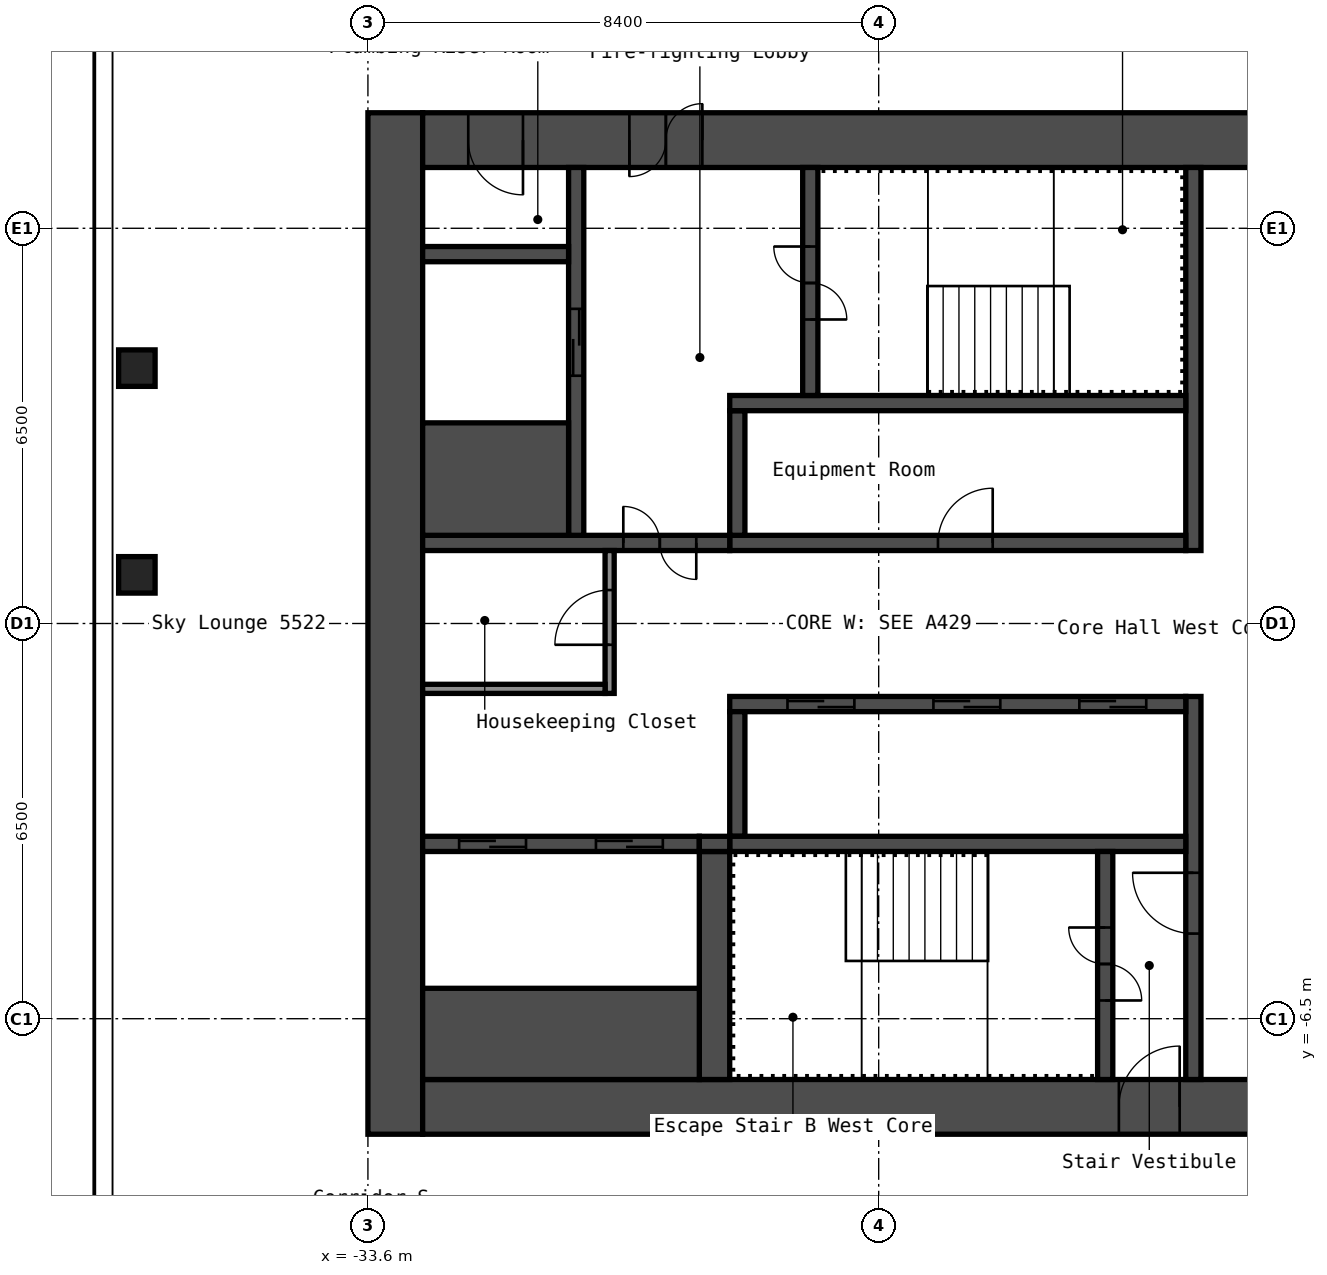
"""IFC4 building model, lengths in metres.
Left out: names, types, materials, properties, quantities, classifications, styles, units other than length and angle.
Written with IfcOpenShell. Run it as: python <this file> out.ifc"""

import sys

from ifc_helpers import new_model, si_unit, direction, frame, frame_2d, origin, origin_2d, place, context, subcontext, project, spatial, rectangle, hollow_rectangle, extrude, element, fill, save


model = new_model("IFC4")
c1 = context("Model", 3, precision=1e-05, world=origin(), true_north=direction((0.0, 1.0)))
c2 = subcontext(c1, "Body", "Model", "MODEL_VIEW")
j1 = project(units=[si_unit("LENGTHUNIT", "METRE"), si_unit("PLANEANGLEUNIT", "RADIAN")], contexts=[c1])
p1 = place(None, origin())
s1 = spatial("IfcSite", under=j1, at=p1, CompositionType="ELEMENT")
p2 = place(p1, origin())
s2 = spatial("IfcBuilding", under=s1, at=p2, CompositionType="ELEMENT")
p3 = place(p2, frame((0.0, 0.0, 196.2)))
s3 = spatial("IfcBuildingStorey", under=s2, at=p3, CompositionType="ELEMENT", Elevation=196.2)
for number, where, z_axis, x_axis in (
    (1, (-37.4, 0.8, 0.0), (0.0, 0.0, 1.0), (1.0, 0.0, 0.0)),
    (2, (-37.4, 4.2, 0.0), (0.0, 0.0, 1.0), (1.0, 0.0, 0.0)),
):
    element("IfcColumn", number, at=place(p3, frame(where, z_axis=z_axis, x_axis=x_axis)), inside=s3, PredefinedType="COLUMN", context=c2, shape_type="SweptSolid", body=[
        extrude(hollow_rectangle(XDim=0.6, YDim=0.6, WallThickness=0.025, InnerFilletRadius=0.038, OuterFilletRadius=0.062, at=origin_2d()), origin(), (0.0, 0.0, 1.0), 2.75),
    ])
p4 = place(p3, frame((-33.15, -8.4, 0.0), z_axis=(0.0, 0.0, 1.0), x_axis=(0.0, 1.0, 0.0)))
e3 = element("IfcWall", 3, at=p4, inside=s3, PredefinedType="SHEAR", context=c2, shape_type="SweptSolid", body=[
    extrude(rectangle(XDim=16.8, YDim=0.9, at=frame_2d((8.4, 0.0))), origin(), (0.0, 0.0, 1.0), 2.75),
])
p5 = place(p3, frame((-32.7, 7.95, 0.0), z_axis=(0.0, 0.0, 1.0), x_axis=(1.0, 0.0, 0.0)))
e4 = element("IfcWall", 4, at=p5, inside=s3, PredefinedType="SHEAR", context=c2, shape_type="SweptSolid", body=[
    extrude(rectangle(XDim=15.0, YDim=0.9, at=frame_2d((7.5, 0.0))), origin(), (0.0, 0.0, 1.0), 2.75),
])
p6 = place(p5, frame((3.4, 0.0, 0.0)))
e5 = element("IfcOpeningElement", 5, at=p6, cuts=e4, PredefinedType="OPENING", context=c2, shape_type="SweptSolid", body=[
    extrude(rectangle(XDim=1.2, YDim=2.1, at=frame_2d((0.6, 1.05))), frame((0.0, 0.46, 0.0), z_axis=(0.0, -1.0, 0.0), x_axis=(1.0, 0.0, 0.0)), (0.0, 0.0, 1.0), 0.92),
])
p7 = place(p5, frame((0.75, 0.0, 0.0)))
e6 = element("IfcOpeningElement", 6, at=p7, cuts=e4, PredefinedType="OPENING", context=c2, shape_type="SweptSolid", body=[
    extrude(rectangle(XDim=0.9, YDim=2.1, at=frame_2d((0.45, 1.05))), frame((0.0, 0.46, 0.0), z_axis=(0.0, -1.0, 0.0), x_axis=(1.0, 0.0, 0.0)), (0.0, 0.0, 1.0), 0.92),
])
p8 = place(p3, frame((-32.7, -7.95, 0.0), z_axis=(0.0, 0.0, 1.0), x_axis=(1.0, 0.0, 0.0)))
e7 = element("IfcWall", 7, at=p8, inside=s3, PredefinedType="SHEAR", context=c2, shape_type="SweptSolid", body=[
    extrude(rectangle(XDim=15.0, YDim=0.9, at=frame_2d((7.5, 0.0))), origin(), (0.0, 0.0, 1.0), 2.75),
])
p9 = place(p8, frame((11.45, 0.0, 0.0)))
e8 = element("IfcOpeningElement", 8, at=p9, cuts=e7, PredefinedType="OPENING", context=c2, shape_type="SweptSolid", body=[
    extrude(rectangle(XDim=1.0, YDim=2.1, at=frame_2d((0.5, 1.05))), frame((0.0, 0.46, 0.0), z_axis=(0.0, -1.0, 0.0), x_axis=(1.0, 0.0, 0.0)), (0.0, 0.0, 1.0), 0.92),
])
p10 = place(p3, frame((-20.025, 1.2, 0.0), z_axis=(0.0, 0.0, 1.0), x_axis=(0.0, 1.0, 0.0)))
e9 = element("IfcWall", 9, at=p10, inside=s3, PredefinedType="SHEAR", context=c2, shape_type="SweptSolid", body=[
    extrude(rectangle(XDim=6.3, YDim=0.25, at=frame_2d((3.15, 0.0))), origin(), (0.0, 0.0, 1.0), 2.75),
])
p11 = place(p3, frame((-20.025, -7.5, 0.0), z_axis=(0.0, 0.0, 1.0), x_axis=(0.0, 1.0, 0.0)))
e10 = element("IfcWall", 10, at=p11, inside=s3, PredefinedType="SHEAR", context=c2, shape_type="SweptSolid", body=[
    extrude(rectangle(XDim=6.3, YDim=0.25, at=frame_2d((3.15, 0.0))), origin(), (0.0, 0.0, 1.0), 2.75),
])
p12 = place(p11, frame((2.4, 0.0, 0.0)))
e11 = element("IfcOpeningElement", 11, at=p12, cuts=e10, PredefinedType="OPENING", context=c2, shape_type="SweptSolid", body=[
    extrude(rectangle(XDim=1.0, YDim=2.1, at=frame_2d((0.5, 1.05))), frame((0.0, 0.135, 0.0), z_axis=(0.0, -1.0, 0.0), x_axis=(1.0, 0.0, 0.0)), (0.0, 0.0, 1.0), 0.27),
])
p13 = place(p3, frame((-27.65, 1.325, 0.0), z_axis=(0.0, 0.0, 1.0), x_axis=(1.0, 0.0, 0.0)))
e12 = element("IfcWall", 12, at=p13, inside=s3, PredefinedType="SHEAR", context=c2, shape_type="SweptSolid", body=[
    extrude(rectangle(XDim=7.5, YDim=0.25, at=frame_2d((3.75, 0.0))), origin(), (0.0, 0.0, 1.0), 2.75),
])
p14 = place(p13, frame((3.425, 0.0, 0.0)))
e13 = element("IfcOpeningElement", 13, at=p14, cuts=e12, PredefinedType="OPENING", context=c2, shape_type="SweptSolid", body=[
    extrude(rectangle(XDim=0.9, YDim=2.1, at=frame_2d((0.45, 1.05))), frame((0.0, 0.135, 0.0), z_axis=(0.0, -1.0, 0.0), x_axis=(1.0, 0.0, 0.0)), (0.0, 0.0, 1.0), 0.27),
])
p15 = place(p3, frame((-27.525, 1.45, 0.0), z_axis=(0.0, 0.0, 1.0), x_axis=(0.0, 1.0, 0.0)))
e14 = element("IfcWall", 14, at=p15, inside=s3, PredefinedType="SHEAR", context=c2, shape_type="SweptSolid", body=[
    extrude(rectangle(XDim=2.05, YDim=0.25, at=frame_2d((1.025, 0.0))), origin(), (0.0, 0.0, 1.0), 2.75),
])
p16 = place(p3, frame((-27.65, 3.625, 0.0), z_axis=(0.0, 0.0, 1.0), x_axis=(1.0, 0.0, 0.0)))
e15 = element("IfcWall", 15, at=p16, inside=s3, PredefinedType="SHEAR", context=c2, shape_type="SweptSolid", body=[
    extrude(rectangle(XDim=7.5, YDim=0.25, at=frame_2d((3.75, 0.0))), origin(), (0.0, 0.0, 1.0), 2.75),
])
p17 = place(p3, frame((-26.325, 3.75, 0.0), z_axis=(0.0, 0.0, 1.0), x_axis=(0.0, 1.0, 0.0)))
e16 = element("IfcWall", 16, at=p17, inside=s3, PredefinedType="SHEAR", context=c2, shape_type="SweptSolid", body=[
    extrude(rectangle(XDim=3.75, YDim=0.25, at=frame_2d((1.875, 0.0))), origin(), (0.0, 0.0, 1.0), 2.75),
])
p18 = place(p17, frame((1.25, 0.0, 0.0)))
e17 = element("IfcOpeningElement", 17, at=p18, cuts=e16, PredefinedType="OPENING", context=c2, shape_type="SweptSolid", body=[
    extrude(rectangle(XDim=1.2, YDim=2.1, at=frame_2d((0.6, 1.05))), frame((0.0, 0.135, 0.0), z_axis=(0.0, -1.0, 0.0), x_axis=(1.0, 0.0, 0.0)), (0.0, 0.0, 1.0), 0.27),
])
p19 = place(p3, frame((-32.7, 1.325, 0.0), z_axis=(0.0, 0.0, 1.0), x_axis=(1.0, 0.0, 0.0)))
e18 = element("IfcWall", 18, at=p19, inside=s3, PredefinedType="SHEAR", context=c2, shape_type="SweptSolid", body=[
    extrude(rectangle(XDim=5.05, YDim=0.25, at=frame_2d((2.525, 0.0))), origin(), (0.0, 0.0, 1.0), 2.75),
])
p20 = place(p19, frame((3.3, 0.0, 0.0)))
e19 = element("IfcOpeningElement", 19, at=p20, cuts=e18, PredefinedType="OPENING", context=c2, shape_type="SweptSolid", body=[
    extrude(rectangle(XDim=1.2, YDim=2.1, at=frame_2d((0.6, 1.05))), frame((0.0, 0.135, 0.0), z_axis=(0.0, -1.0, 0.0), x_axis=(1.0, 0.0, 0.0)), (0.0, 0.0, 1.0), 0.27),
])
p21 = place(p3, frame((-30.175, 1.45, 0.0), z_axis=(0.0, 0.0, 1.0), x_axis=(0.0, 1.0, 0.0)))
e20 = element("IfcWall", 20, at=p21, inside=s3, PredefinedType="SHEAR", context=c2, shape_type="SweptSolid", body=[
    extrude(rectangle(XDim=6.05, YDim=0.25, at=frame_2d((3.025, 0.0))), origin(), (0.0, 0.0, 1.0), 2.75),
])
p22 = place(p21, frame((2.625, 0.0, 0.0)))
e21 = element("IfcOpeningElement", 21, at=p22, cuts=e20, PredefinedType="OPENING", context=c2, shape_type="SweptSolid", body=[
    extrude(rectangle(XDim=1.1, YDim=2.1, at=frame_2d((0.55, 1.05))), frame((0.0, 0.135, 0.0), z_axis=(0.0, -1.0, 0.0), x_axis=(1.0, 0.0, 0.0)), (0.0, 0.0, 1.0), 0.27),
])
p23 = place(p3, frame((-32.7, 2.375, 0.0), z_axis=(0.0, 0.0, 1.0), x_axis=(1.0, 0.0, 0.0)))
e22 = element("IfcWall", 22, at=p23, inside=s3, PredefinedType="SHEAR", context=c2, shape_type="SweptSolid", body=[
    extrude(rectangle(XDim=2.4, YDim=1.85, at=frame_2d((1.2, 0.0))), origin(), (0.0, 0.0, 1.0), 2.75),
])
p24 = place(p3, frame((-32.7, 6.075, 0.0), z_axis=(0.0, 0.0, 1.0), x_axis=(1.0, 0.0, 0.0)))
e23 = element("IfcWall", 23, at=p24, inside=s3, PredefinedType="SHEAR", context=c2, shape_type="SweptSolid", body=[
    extrude(rectangle(XDim=2.4, YDim=0.25, at=frame_2d((1.2, 0.0))), origin(), (0.0, 0.0, 1.0), 2.75),
])
p25 = place(p3, frame((-27.65, -1.325, 0.0), z_axis=(0.0, 0.0, 1.0), x_axis=(1.0, 0.0, 0.0)))
e24 = element("IfcWall", 24, at=p25, inside=s3, PredefinedType="SHEAR", context=c2, shape_type="SweptSolid", body=[
    extrude(rectangle(XDim=7.5, YDim=0.25, at=frame_2d((3.75, 0.0))), origin(), (0.0, 0.0, 1.0), 2.75),
])
p26 = place(p25, frame((5.75, 0.0, 0.0)))
e25 = element("IfcOpeningElement", 25, at=p26, cuts=e24, PredefinedType="OPENING", context=c2, shape_type="SweptSolid", body=[
    extrude(rectangle(XDim=1.1, YDim=2.1, at=frame_2d((0.55, 1.05))), frame((0.0, 0.135, 0.0), z_axis=(0.0, -1.0, 0.0), x_axis=(1.0, 0.0, 0.0)), (0.0, 0.0, 1.0), 0.27),
])
p27 = place(p25, frame((3.35, 0.0, 0.0)))
e26 = element("IfcOpeningElement", 26, at=p27, cuts=e24, PredefinedType="OPENING", context=c2, shape_type="SweptSolid", body=[
    extrude(rectangle(XDim=1.1, YDim=2.1, at=frame_2d((0.55, 1.05))), frame((0.0, 0.135, 0.0), z_axis=(0.0, -1.0, 0.0), x_axis=(1.0, 0.0, 0.0)), (0.0, 0.0, 1.0), 0.27),
])
p28 = place(p25, frame((0.95, 0.0, 0.0)))
e27 = element("IfcOpeningElement", 27, at=p28, cuts=e24, PredefinedType="OPENING", context=c2, shape_type="SweptSolid", body=[
    extrude(rectangle(XDim=1.1, YDim=2.1, at=frame_2d((0.55, 1.05))), frame((0.0, 0.135, 0.0), z_axis=(0.0, -1.0, 0.0), x_axis=(1.0, 0.0, 0.0)), (0.0, 0.0, 1.0), 0.27),
])
p29 = place(p3, frame((-27.525, -3.5, 0.0), z_axis=(0.0, 0.0, 1.0), x_axis=(0.0, 1.0, 0.0)))
e28 = element("IfcWall", 28, at=p29, inside=s3, PredefinedType="SHEAR", context=c2, shape_type="SweptSolid", body=[
    extrude(rectangle(XDim=2.05, YDim=0.25, at=frame_2d((1.025, 0.0))), origin(), (0.0, 0.0, 1.0), 2.75),
])
p30 = place(p3, frame((-27.65, -3.625, 0.0), z_axis=(0.0, 0.0, 1.0), x_axis=(1.0, 0.0, 0.0)))
e29 = element("IfcWall", 29, at=p30, inside=s3, PredefinedType="SHEAR", context=c2, shape_type="SweptSolid", body=[
    extrude(rectangle(XDim=7.5, YDim=0.25, at=frame_2d((3.75, 0.0))), origin(), (0.0, 0.0, 1.0), 2.75),
])
p31 = place(p3, frame((-21.475, -7.5, 0.0), z_axis=(0.0, 0.0, 1.0), x_axis=(0.0, 1.0, 0.0)))
e30 = element("IfcWall", 30, at=p31, inside=s3, PredefinedType="SHEAR", context=c2, shape_type="SweptSolid", body=[
    extrude(rectangle(XDim=3.75, YDim=0.25, at=frame_2d((1.875, 0.0))), origin(), (0.0, 0.0, 1.0), 2.75),
])
p32 = place(p31, frame((1.3, 0.0, 0.0)))
e31 = element("IfcOpeningElement", 31, at=p32, cuts=e30, PredefinedType="OPENING", context=c2, shape_type="SweptSolid", body=[
    extrude(rectangle(XDim=1.2, YDim=2.1, at=frame_2d((0.6, 1.05))), frame((0.0, 0.135, 0.0), z_axis=(0.0, -1.0, 0.0), x_axis=(1.0, 0.0, 0.0)), (0.0, 0.0, 1.0), 0.27),
])
p33 = place(p3, frame((-27.9, -7.5, 0.0), z_axis=(0.0, 0.0, 1.0), x_axis=(0.0, 1.0, 0.0)))
e32 = element("IfcWall", 32, at=p33, inside=s3, PredefinedType="SHEAR", context=c2, shape_type="SweptSolid", body=[
    extrude(rectangle(XDim=3.75, YDim=0.5, at=frame_2d((1.875, 0.0))), origin(), (0.0, 0.0, 1.0), 2.75),
])
p34 = place(p3, frame((-32.7, -3.625, 0.0), z_axis=(0.0, 0.0, 1.0), x_axis=(1.0, 0.0, 0.0)))
e33 = element("IfcWall", 33, at=p34, inside=s3, PredefinedType="SHEAR", context=c2, shape_type="SweptSolid", body=[
    extrude(rectangle(XDim=4.55, YDim=0.25, at=frame_2d((2.275, 0.0))), origin(), (0.0, 0.0, 1.0), 2.75),
])
p35 = place(p34, frame((2.85, 0.0, 0.0)))
e34 = element("IfcOpeningElement", 34, at=p35, cuts=e33, PredefinedType="OPENING", context=c2, shape_type="SweptSolid", body=[
    extrude(rectangle(XDim=1.1, YDim=2.1, at=frame_2d((0.55, 1.05))), frame((0.0, 0.135, 0.0), z_axis=(0.0, -1.0, 0.0), x_axis=(1.0, 0.0, 0.0)), (0.0, 0.0, 1.0), 0.27),
])
p36 = place(p34, frame((0.6, 0.0, 0.0)))
e35 = element("IfcOpeningElement", 35, at=p36, cuts=e33, PredefinedType="OPENING", context=c2, shape_type="SweptSolid", body=[
    extrude(rectangle(XDim=1.1, YDim=2.1, at=frame_2d((0.55, 1.05))), frame((0.0, 0.135, 0.0), z_axis=(0.0, -1.0, 0.0), x_axis=(1.0, 0.0, 0.0)), (0.0, 0.0, 1.0), 0.27),
])
p37 = place(p3, frame((-32.7, -6.75, 0.0), z_axis=(0.0, 0.0, 1.0), x_axis=(1.0, 0.0, 0.0)))
e36 = element("IfcWall", 36, at=p37, inside=s3, PredefinedType="SHEAR", context=c2, shape_type="SweptSolid", body=[
    extrude(rectangle(XDim=4.55, YDim=1.5, at=frame_2d((2.275, 0.0))), origin(), (0.0, 0.0, 1.0), 2.75),
])
p38 = place(p3, frame((-28.15, -3.625, 0.0), z_axis=(0.0, 0.0, 1.0), x_axis=(1.0, 0.0, 0.0)))
e37 = element("IfcWall", 37, at=p38, inside=s3, PredefinedType="SHEAR", context=c2, shape_type="SweptSolid", body=[
    extrude(rectangle(XDim=0.5, YDim=0.25, at=frame_2d((0.25, 0.0))), origin(), (0.0, 0.0, 1.0), 2.75),
])
p39 = place(p3, frame((-29.625, -1.15, 0.0), z_axis=(0.0, 0.0, 1.0), x_axis=(0.0, 1.0, 0.0)))
e38 = element("IfcWall", 38, at=p39, inside=s3, PredefinedType="PARTITIONING", context=c2, shape_type="SweptSolid", body=[
    extrude(rectangle(XDim=2.35, YDim=0.15, at=frame_2d((1.175, 0.0))), origin(), (0.0, 0.0, 1.0), 2.75),
])
p40 = place(p39, frame((0.8, 0.0, 0.0)))
e39 = element("IfcOpeningElement", 39, at=p40, cuts=e38, PredefinedType="OPENING", context=c2, shape_type="SweptSolid", body=[
    extrude(rectangle(XDim=0.9, YDim=2.1, at=frame_2d((0.45, 1.05))), frame((0.0, 0.085, 0.0), z_axis=(0.0, -1.0, 0.0), x_axis=(1.0, 0.0, 0.0)), (0.0, 0.0, 1.0), 0.17),
])
p41 = place(p3, frame((-32.7, -1.075, 0.0), z_axis=(0.0, 0.0, 1.0), x_axis=(1.0, 0.0, 0.0)))
e40 = element("IfcWall", 40, at=p41, inside=s3, PredefinedType="PARTITIONING", context=c2, shape_type="SweptSolid", body=[
    extrude(rectangle(XDim=3.0, YDim=0.15, at=frame_2d((1.5, 0.0))), origin(), (0.0, 0.0, 1.0), 2.75),
])
p42 = place(p6, origin())
e41 = element("IfcDoor", 41, at=p42, inside=s3, OperationType="DOUBLE_DOOR_SINGLE_SWING", PredefinedType="DOOR", context=c2, shape_type="SweptSolid", body=[
    extrude(rectangle(XDim=1.2, YDim=2.1, at=frame_2d((0.6, 1.05))), frame((0.0, 0.025, 0.0), z_axis=(0.0, -1.0, 0.0), x_axis=(1.0, 0.0, 0.0)), (0.0, 0.0, 1.0), 0.05),
])
fill(e5, e41)
p43 = place(p7, origin())
e42 = element("IfcDoor", 42, at=p43, inside=s3, OperationType="SINGLE_SWING_RIGHT", PredefinedType="DOOR", context=c2, shape_type="SweptSolid", body=[
    extrude(rectangle(XDim=0.9, YDim=2.1, at=frame_2d((0.45, 1.05))), frame((0.0, 0.025, 0.0), z_axis=(0.0, -1.0, 0.0), x_axis=(1.0, 0.0, 0.0)), (0.0, 0.0, 1.0), 0.05),
])
fill(e6, e42)
p44 = place(p9, origin())
e43 = element("IfcDoor", 43, at=p44, inside=s3, OperationType="SINGLE_SWING_LEFT", PredefinedType="DOOR", context=c2, shape_type="SweptSolid", body=[
    extrude(rectangle(XDim=1.0, YDim=2.1, at=frame_2d((0.5, 1.05))), frame((0.0, 0.025, 0.0), z_axis=(0.0, -1.0, 0.0), x_axis=(1.0, 0.0, 0.0)), (0.0, 0.0, 1.0), 0.05),
])
fill(e8, e43)
p45 = place(p18, origin())
e44 = element("IfcDoor", 44, at=p45, inside=s3, OperationType="DOUBLE_DOOR_SINGLE_SWING", PredefinedType="DOOR", context=c2, shape_type="SweptSolid", body=[
    extrude(rectangle(XDim=1.2, YDim=2.1, at=frame_2d((0.6, 1.05))), frame((0.0, 0.025, 0.0), z_axis=(0.0, -1.0, 0.0), x_axis=(1.0, 0.0, 0.0)), (0.0, 0.0, 1.0), 0.05),
])
fill(e17, e44)
p46 = place(p32, origin())
e45 = element("IfcDoor", 45, at=p46, inside=s3, OperationType="DOUBLE_DOOR_SINGLE_SWING", PredefinedType="DOOR", context=c2, shape_type="SweptSolid", body=[
    extrude(rectangle(XDim=1.2, YDim=2.1, at=frame_2d((0.6, 1.05))), frame((0.0, 0.025, 0.0), z_axis=(0.0, -1.0, 0.0), x_axis=(1.0, 0.0, 0.0)), (0.0, 0.0, 1.0), 0.05),
])
fill(e31, e45)
p47 = place(p12, origin())
e46 = element("IfcDoor", 46, at=p47, inside=s3, OperationType="SINGLE_SWING_LEFT", PredefinedType="DOOR", context=c2, shape_type="SweptSolid", body=[
    extrude(rectangle(XDim=1.0, YDim=2.1, at=frame_2d((0.5, 1.05))), frame((0.0, 0.025, 0.0), z_axis=(0.0, -1.0, 0.0), x_axis=(1.0, 0.0, 0.0)), (0.0, 0.0, 1.0), 0.05),
])
fill(e11, e46)
p48 = place(p20, origin())
e47 = element("IfcDoor", 47, at=p48, inside=s3, OperationType="DOUBLE_DOOR_SINGLE_SWING", PredefinedType="DOOR", context=c2, shape_type="SweptSolid", body=[
    extrude(rectangle(XDim=1.2, YDim=2.1, at=frame_2d((0.6, 1.05))), frame((0.0, 0.025, 0.0), z_axis=(0.0, -1.0, 0.0), x_axis=(1.0, 0.0, 0.0)), (0.0, 0.0, 1.0), 0.05),
])
fill(e19, e47)
p49 = place(p40, origin())
e48 = element("IfcDoor", 48, at=p49, inside=s3, OperationType="SINGLE_SWING_RIGHT", PredefinedType="DOOR", context=c2, shape_type="SweptSolid", body=[
    extrude(rectangle(XDim=0.9, YDim=2.1, at=frame_2d((0.45, 1.05))), frame((0.0, 0.025, 0.0), z_axis=(0.0, -1.0, 0.0), x_axis=(1.0, 0.0, 0.0)), (0.0, 0.0, 1.0), 0.05),
])
fill(e39, e48)
p50 = place(p14, origin())
e49 = element("IfcDoor", 49, at=p50, inside=s3, OperationType="SINGLE_SWING_LEFT", PredefinedType="DOOR", context=c2, shape_type="SweptSolid", body=[
    extrude(rectangle(XDim=0.9, YDim=2.1, at=frame_2d((0.45, 1.05))), frame((0.0, 0.025, 0.0), z_axis=(0.0, -1.0, 0.0), x_axis=(1.0, 0.0, 0.0)), (0.0, 0.0, 1.0), 0.05),
])
fill(e13, e49)
p51 = place(p26, origin())
e50 = element("IfcDoor", 50, at=p51, inside=s3, OperationType="DOUBLE_DOOR_SLIDING", PredefinedType="DOOR", context=c2, shape_type="SweptSolid", body=[
    extrude(rectangle(XDim=1.1, YDim=2.1, at=frame_2d((0.55, 1.05))), frame((0.0, 0.025, 0.0), z_axis=(0.0, -1.0, 0.0), x_axis=(1.0, 0.0, 0.0)), (0.0, 0.0, 1.0), 0.05),
])
fill(e25, e50)
p52 = place(p27, origin())
e51 = element("IfcDoor", 51, at=p52, inside=s3, OperationType="DOUBLE_DOOR_SLIDING", PredefinedType="DOOR", context=c2, shape_type="SweptSolid", body=[
    extrude(rectangle(XDim=1.1, YDim=2.1, at=frame_2d((0.55, 1.05))), frame((0.0, 0.025, 0.0), z_axis=(0.0, -1.0, 0.0), x_axis=(1.0, 0.0, 0.0)), (0.0, 0.0, 1.0), 0.05),
])
fill(e26, e51)
p53 = place(p28, origin())
e52 = element("IfcDoor", 52, at=p53, inside=s3, OperationType="DOUBLE_DOOR_SLIDING", PredefinedType="DOOR", context=c2, shape_type="SweptSolid", body=[
    extrude(rectangle(XDim=1.1, YDim=2.1, at=frame_2d((0.55, 1.05))), frame((0.0, 0.025, 0.0), z_axis=(0.0, -1.0, 0.0), x_axis=(1.0, 0.0, 0.0)), (0.0, 0.0, 1.0), 0.05),
])
fill(e27, e52)
p54 = place(p22, origin())
e53 = element("IfcDoor", 53, at=p54, inside=s3, OperationType="DOUBLE_DOOR_SLIDING", PredefinedType="DOOR", context=c2, shape_type="SweptSolid", body=[
    extrude(rectangle(XDim=1.1, YDim=2.1, at=frame_2d((0.55, 1.05))), frame((0.0, 0.025, 0.0), z_axis=(0.0, -1.0, 0.0), x_axis=(1.0, 0.0, 0.0)), (0.0, 0.0, 1.0), 0.05),
])
fill(e21, e53)
p55 = place(p35, origin())
e54 = element("IfcDoor", 54, at=p55, inside=s3, OperationType="DOUBLE_DOOR_SLIDING", PredefinedType="DOOR", context=c2, shape_type="SweptSolid", body=[
    extrude(rectangle(XDim=1.1, YDim=2.1, at=frame_2d((0.55, 1.05))), frame((0.0, 0.025, 0.0), z_axis=(0.0, -1.0, 0.0), x_axis=(1.0, 0.0, 0.0)), (0.0, 0.0, 1.0), 0.05),
])
fill(e34, e54)
p56 = place(p36, origin())
e55 = element("IfcDoor", 55, at=p56, inside=s3, OperationType="DOUBLE_DOOR_SLIDING", PredefinedType="DOOR", context=c2, shape_type="SweptSolid", body=[
    extrude(rectangle(XDim=1.1, YDim=2.1, at=frame_2d((0.55, 1.05))), frame((0.0, 0.025, 0.0), z_axis=(0.0, -1.0, 0.0), x_axis=(1.0, 0.0, 0.0)), (0.0, 0.0, 1.0), 0.05),
])
fill(e35, e55)
save(model, sys.argv[1])
